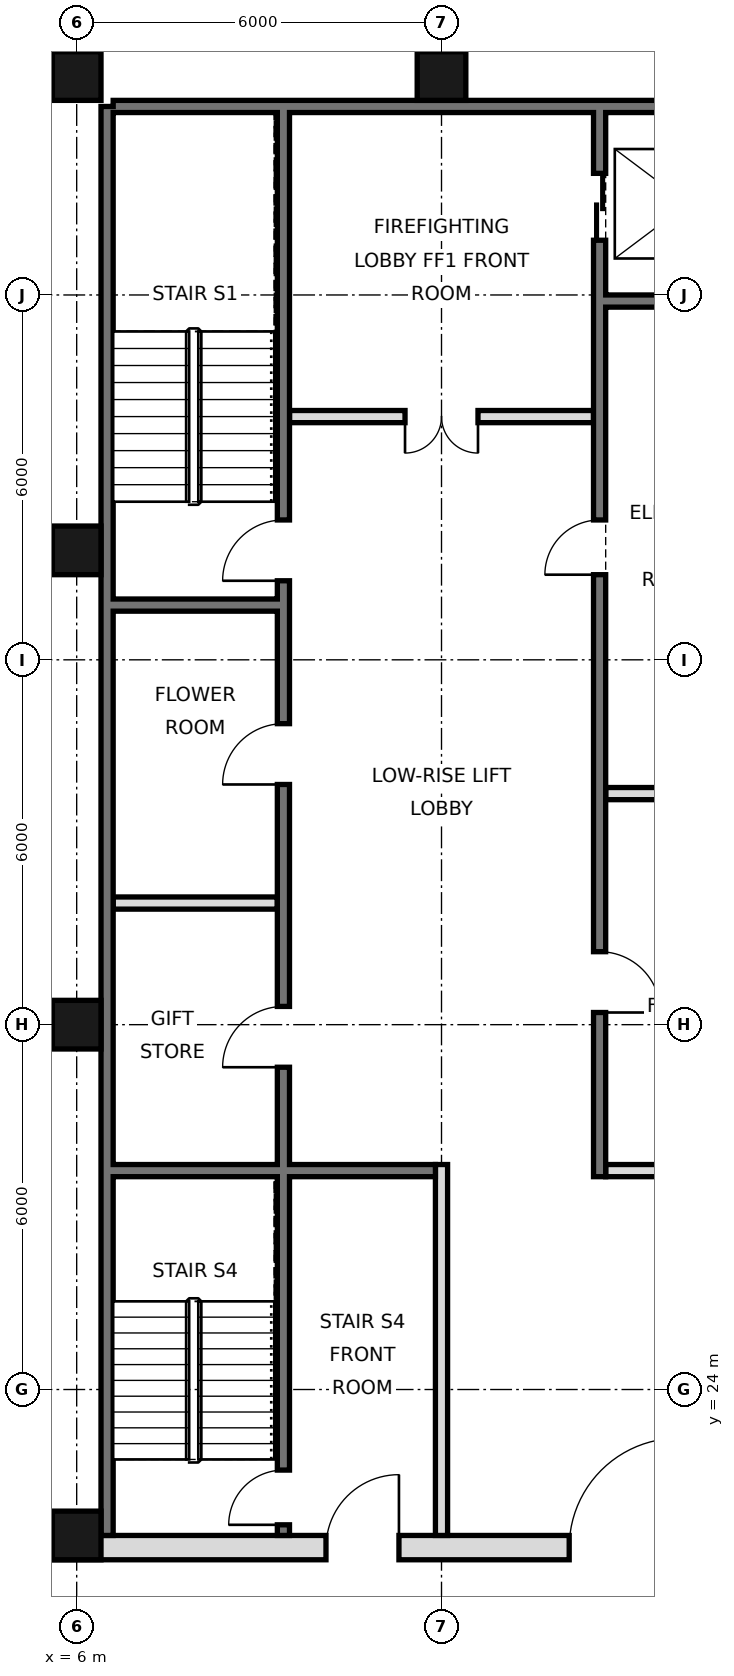
"""IFC4 building model, lengths in metres.
Left out: names, types, materials, properties, quantities, classifications, styles, units other than length and angle.
Written with IfcOpenShell. Run it as: python <this file> out.ifc"""

import sys

from ifc_helpers import new_model, si_unit, direction, frame, frame_2d, origin, origin_2d, place, context, subcontext, project, spatial, rectangle, hollow_rectangle, extrude, element, fill, save


model = new_model("IFC4")
c1 = context("Model", 3, precision=1e-05, world=origin(), true_north=direction((0.0, 1.0)))
c2 = subcontext(c1, "Body", "Model", "MODEL_VIEW")
j1 = project(units=[si_unit("LENGTHUNIT", "METRE"), si_unit("PLANEANGLEUNIT", "RADIAN")], contexts=[c1])
p1 = place(None, origin())
s1 = spatial("IfcSite", under=j1, at=p1, CompositionType="ELEMENT")
p2 = place(p1, origin())
s2 = spatial("IfcBuilding", under=s1, at=p2, CompositionType="ELEMENT")
p3 = place(p2, frame((0.0, 0.0, 263.0)))
s3 = spatial("IfcBuildingStorey", under=s2, at=p3, CompositionType="ELEMENT", Elevation=263.0)
for number, where, z_axis, x_axis in (
    (1, (6.0, 21.6, 0.0), (0.0, 0.0, 1.0), (1.0, 0.0, 0.0)),
    (2, (6.0, 30.0, 0.0), (0.0, 0.0, 1.0), (1.0, 0.0, 0.0)),
    (3, (6.0, 37.8, 0.0), (0.0, 0.0, 1.0), (1.0, 0.0, 0.0)),
    (4, (6.0, 45.6, 0.0), (0.0, 0.0, 1.0), (1.0, 0.0, 0.0)),
    (5, (12.0, 45.6, 0.0), (0.0, 0.0, 1.0), (1.0, 0.0, 0.0)),
):
    element("IfcColumn", number, at=place(p3, frame(where, z_axis=z_axis, x_axis=x_axis)), inside=s3, PredefinedType="COLUMN", context=c2, shape_type="SweptSolid", body=[
        extrude(hollow_rectangle(XDim=0.8, YDim=0.8, WallThickness=0.032, at=origin_2d()), origin(), (0.0, 0.0, 1.0), 3.6),
    ])
p4 = place(p3, frame((6.5, 21.6, 0.0), z_axis=(0.0, 0.0, 1.0), x_axis=(0.0, 1.0, 0.0)))
e6 = element("IfcWall", 6, at=p4, inside=s3, PredefinedType="SOLIDWALL", context=c2, shape_type="SweptSolid", body=[
    extrude(rectangle(XDim=23.5, YDim=0.2, at=frame_2d((11.75, 0.0))), origin(), (0.0, 0.0, 1.0), 3.42),
])
p5 = place(p3, frame((6.6, 45.1, 0.0), z_axis=(0.0, 0.0, 1.0), x_axis=(1.0, 0.0, 0.0)))
e7 = element("IfcWall", 7, at=p5, inside=s3, PredefinedType="SOLIDWALL", context=c2, shape_type="SweptSolid", body=[
    extrude(rectangle(XDim=34.8, YDim=0.2, at=frame_2d((17.4, 0.0))), origin(), (0.0, 0.0, 1.0), 3.42),
])
p6 = place(p3, frame((5.6, 21.4, 0.0), z_axis=(0.0, 0.0, 1.0), x_axis=(1.0, 0.0, 0.0)))
e8 = element("IfcWall", 8, at=p6, inside=s3, PredefinedType="SOLIDWALL", context=c2, shape_type="SweptSolid", body=[
    extrude(rectangle(XDim=36.8, YDim=0.4, at=frame_2d((18.4, 0.0))), origin(), (0.0, 0.0, 1.0), 3.42),
])
p7 = place(p6, frame((8.5, 0.0, 0.0)))
e9 = element("IfcOpeningElement", 9, at=p7, cuts=e8, PredefinedType="OPENING", context=c2, shape_type="SweptSolid", body=[
    extrude(rectangle(XDim=1.8, YDim=2.1, at=frame_2d((0.9, 1.05))), frame((0.0, 0.21, 0.0), z_axis=(0.0, -1.0, 0.0), x_axis=(1.0, 0.0, 0.0)), (0.0, 0.0, 1.0), 0.42),
])
p8 = place(p6, frame((17.5, 0.0, 0.0)))
e10 = element("IfcOpeningElement", 10, at=p8, cuts=e8, PredefinedType="OPENING", context=c2, shape_type="SweptSolid", body=[
    extrude(rectangle(XDim=1.8, YDim=2.1, at=frame_2d((0.9, 1.05))), frame((0.0, 0.21, 0.0), z_axis=(0.0, -1.0, 0.0), x_axis=(1.0, 0.0, 0.0)), (0.0, 0.0, 1.0), 0.42),
])
p9 = place(p6, frame((26.5, 0.0, 0.0)))
e11 = element("IfcOpeningElement", 11, at=p9, cuts=e8, PredefinedType="OPENING", context=c2, shape_type="SweptSolid", body=[
    extrude(rectangle(XDim=1.8, YDim=2.1, at=frame_2d((0.9, 1.05))), frame((0.0, 0.21, 0.0), z_axis=(0.0, -1.0, 0.0), x_axis=(1.0, 0.0, 0.0)), (0.0, 0.0, 1.0), 0.42),
])
p10 = place(p6, frame((4.5, 0.0, 0.0)))
e12 = element("IfcOpeningElement", 12, at=p10, cuts=e8, PredefinedType="OPENING", context=c2, shape_type="SweptSolid", body=[
    extrude(rectangle(XDim=1.2, YDim=2.1, at=frame_2d((0.6, 1.05))), frame((0.0, 0.21, 0.0), z_axis=(0.0, -1.0, 0.0), x_axis=(1.0, 0.0, 0.0)), (0.0, 0.0, 1.0), 0.42),
])
p11 = place(p6, frame((31.1, 0.0, 0.0)))
e13 = element("IfcOpeningElement", 13, at=p11, cuts=e8, PredefinedType="OPENING", context=c2, shape_type="SweptSolid", body=[
    extrude(rectangle(XDim=1.2, YDim=2.1, at=frame_2d((0.6, 1.05))), frame((0.0, 0.21, 0.0), z_axis=(0.0, -1.0, 0.0), x_axis=(1.0, 0.0, 0.0)), (0.0, 0.0, 1.0), 0.42),
])
p12 = place(p3, frame((12.0, 21.6, 0.0), z_axis=(0.0, 0.0, 1.0), x_axis=(0.0, 1.0, 0.0)))
e14 = element("IfcWall", 14, at=p12, inside=s3, PredefinedType="PARTITIONING", context=c2, shape_type="SweptSolid", body=[
    extrude(rectangle(XDim=6.1, YDim=0.2, at=frame_2d((3.05, 0.0))), origin(), (0.0, 0.0, 1.0), 3.42),
])
p13 = place(p3, frame((14.6, 27.5, 0.0), z_axis=(0.0, 0.0, 1.0), x_axis=(0.0, 1.0, 0.0)))
e15 = element("IfcWall", 15, at=p13, inside=s3, PredefinedType="SOLIDWALL", context=c2, shape_type="SweptSolid", body=[
    extrude(rectangle(XDim=17.5, YDim=0.2, at=frame_2d((8.75, 0.0))), origin(), (0.0, 0.0, 1.0), 3.42),
])
p14 = place(p13, frame((15.4, 0.0, 0.0)))
e16 = element("IfcOpeningElement", 16, at=p14, cuts=e15, PredefinedType="OPENING", context=c2, shape_type="SweptSolid", body=[
    extrude(rectangle(XDim=1.1, YDim=2.1, at=frame_2d((0.55, 1.05))), frame((0.0, 0.11, 0.0), z_axis=(0.0, -1.0, 0.0), x_axis=(1.0, 0.0, 0.0)), (0.0, 0.0, 1.0), 0.22),
])
p15 = place(p13, frame((2.7, 0.0, 0.0)))
e17 = element("IfcOpeningElement", 17, at=p15, cuts=e15, PredefinedType="OPENING", context=c2, shape_type="SweptSolid", body=[
    extrude(rectangle(XDim=1.0, YDim=2.1, at=frame_2d((0.5, 1.05))), frame((0.0, 0.11, 0.0), z_axis=(0.0, -1.0, 0.0), x_axis=(1.0, 0.0, 0.0)), (0.0, 0.0, 1.0), 0.22),
])
p16 = place(p13, frame((9.9, 0.0, 0.0)))
e18 = element("IfcOpeningElement", 18, at=p16, cuts=e15, PredefinedType="OPENING", context=c2, shape_type="SweptSolid", body=[
    extrude(rectangle(XDim=0.9, YDim=2.1, at=frame_2d((0.45, 1.05))), frame((0.0, 0.11, 0.0), z_axis=(0.0, -1.0, 0.0), x_axis=(1.0, 0.0, 0.0)), (0.0, 0.0, 1.0), 0.22),
])
p17 = place(p3, frame((9.4, 21.6, 0.0), z_axis=(0.0, 0.0, 1.0), x_axis=(0.0, 1.0, 0.0)))
e19 = element("IfcWall", 19, at=p17, inside=s3, PredefinedType="SOLIDWALL", context=c2, shape_type="SweptSolid", body=[
    extrude(rectangle(XDim=23.4, YDim=0.2, at=frame_2d((11.7, 0.0))), origin(), (0.0, 0.0, 1.0), 3.42),
])
p18 = place(p17, frame((7.7, 0.0, 0.0)))
e20 = element("IfcOpeningElement", 20, at=p18, cuts=e19, PredefinedType="OPENING", context=c2, shape_type="SweptSolid", body=[
    extrude(rectangle(XDim=1.0, YDim=2.1, at=frame_2d((0.5, 1.05))), frame((0.0, 0.11, 0.0), z_axis=(0.0, -1.0, 0.0), x_axis=(1.0, 0.0, 0.0)), (0.0, 0.0, 1.0), 0.22),
])
p19 = place(p17, frame((12.35, 0.0, 0.0)))
e21 = element("IfcOpeningElement", 21, at=p19, cuts=e19, PredefinedType="OPENING", context=c2, shape_type="SweptSolid", body=[
    extrude(rectangle(XDim=1.0, YDim=2.1, at=frame_2d((0.5, 1.05))), frame((0.0, 0.11, 0.0), z_axis=(0.0, -1.0, 0.0), x_axis=(1.0, 0.0, 0.0)), (0.0, 0.0, 1.0), 0.22),
])
p20 = place(p17, frame((15.7, 0.0, 0.0)))
e22 = element("IfcOpeningElement", 22, at=p20, cuts=e19, PredefinedType="OPENING", context=c2, shape_type="SweptSolid", body=[
    extrude(rectangle(XDim=1.0, YDim=2.1, at=frame_2d((0.5, 1.05))), frame((0.0, 0.11, 0.0), z_axis=(0.0, -1.0, 0.0), x_axis=(1.0, 0.0, 0.0)), (0.0, 0.0, 1.0), 0.22),
])
p21 = place(p17, frame((0.175, 0.0, 0.0)))
e23 = element("IfcOpeningElement", 23, at=p21, cuts=e19, PredefinedType="OPENING", context=c2, shape_type="SweptSolid", body=[
    extrude(rectangle(XDim=0.9, YDim=2.1, at=frame_2d((0.45, 1.05))), frame((0.0, 0.11, 0.0), z_axis=(0.0, -1.0, 0.0), x_axis=(1.0, 0.0, 0.0)), (0.0, 0.0, 1.0), 0.22),
])
p22 = place(p3, frame((14.7, 27.6, 0.0), z_axis=(0.0, 0.0, 1.0), x_axis=(1.0, 0.0, 0.0)))
e24 = element("IfcWall", 24, at=p22, inside=s3, PredefinedType="PARTITIONING", context=c2, shape_type="SweptSolid", body=[
    extrude(rectangle(XDim=2.7, YDim=0.2, at=frame_2d((1.35, 0.0))), origin(), (0.0, 0.0, 1.0), 3.42),
])
p23 = place(p3, frame((6.6, 27.6, 0.0), z_axis=(0.0, 0.0, 1.0), x_axis=(1.0, 0.0, 0.0)))
e25 = element("IfcWall", 25, at=p23, inside=s3, PredefinedType="SOLIDWALL", context=c2, shape_type="SweptSolid", body=[
    extrude(rectangle(XDim=5.3, YDim=0.2, at=frame_2d((2.65, 0.0))), origin(), (0.0, 0.0, 1.0), 3.42),
])
p24 = place(p3, frame((6.6, 32.0, 0.0), z_axis=(0.0, 0.0, 1.0), x_axis=(1.0, 0.0, 0.0)))
e26 = element("IfcWall", 26, at=p24, inside=s3, PredefinedType="PARTITIONING", context=c2, shape_type="SweptSolid", body=[
    extrude(rectangle(XDim=2.7, YDim=0.2, at=frame_2d((1.35, 0.0))), origin(), (0.0, 0.0, 1.0), 3.42),
])
for number, where, z_axis, x_axis in (
    (27, (14.7, 33.8, 0.0), (0.0, 0.0, 1.0), (1.0, 0.0, 0.0)),
    (28, (6.6, 36.9, 0.0), (0.0, 0.0, 1.0), (1.0, 0.0, 0.0)),
):
    element("IfcWall", number, at=place(p3, frame(where, z_axis=z_axis, x_axis=x_axis)), inside=s3, PredefinedType="SOLIDWALL", context=c2, shape_type="SweptSolid", body=[
        extrude(rectangle(XDim=2.7, YDim=0.2, at=frame_2d((1.35, 0.0))), origin(), (0.0, 0.0, 1.0), 3.42),
    ])
p25 = place(p3, frame((9.5, 40.0, 0.0), z_axis=(0.0, 0.0, 1.0), x_axis=(1.0, 0.0, 0.0)))
e29 = element("IfcWall", 29, at=p25, inside=s3, PredefinedType="PARTITIONING", context=c2, shape_type="SweptSolid", body=[
    extrude(rectangle(XDim=5.0, YDim=0.2, at=frame_2d((2.5, 0.0))), origin(), (0.0, 0.0, 1.0), 3.42),
])
p26 = place(p25, frame((1.9, 0.0, 0.0)))
e30 = element("IfcOpeningElement", 30, at=p26, cuts=e29, PredefinedType="OPENING", context=c2, shape_type="SweptSolid", body=[
    extrude(rectangle(XDim=1.2, YDim=2.1, at=frame_2d((0.6, 1.05))), frame((0.0, 0.11, 0.0), z_axis=(0.0, -1.0, 0.0), x_axis=(1.0, 0.0, 0.0)), (0.0, 0.0, 1.0), 0.22),
])
p27 = place(p3, frame((14.7, 41.9, 0.0), z_axis=(0.0, 0.0, 1.0), x_axis=(1.0, 0.0, 0.0)))
e31 = element("IfcWall", 31, at=p27, inside=s3, PredefinedType="SOLIDWALL", context=c2, shape_type="SweptSolid", body=[
    extrude(rectangle(XDim=2.7, YDim=0.2, at=frame_2d((1.35, 0.0))), origin(), (0.0, 0.0, 1.0), 3.42),
])
p28 = place(p7, frame((1.8, 0.0, 0.0), z_axis=(0.0, 0.0, 1.0), x_axis=(-1.0, 0.0, 0.0)))
e32 = element("IfcDoor", 32, at=p28, inside=s3, OperationType="SINGLE_SWING_LEFT", PredefinedType="DOOR", context=c2, shape_type="SweptSolid", body=[
    extrude(rectangle(XDim=1.8, YDim=2.1, at=frame_2d((0.9, 1.05))), frame((0.0, 0.025, 0.0), z_axis=(0.0, -1.0, 0.0), x_axis=(1.0, 0.0, 0.0)), (0.0, 0.0, 1.0), 0.05),
])
fill(e9, e32)
p29 = place(p10, frame((1.2, 0.0, 0.0), z_axis=(0.0, 0.0, 1.0), x_axis=(-1.0, 0.0, 0.0)))
e33 = element("IfcDoor", 33, at=p29, inside=s3, OperationType="SINGLE_SWING_LEFT", PredefinedType="DOOR", context=c2, shape_type="SweptSolid", body=[
    extrude(rectangle(XDim=1.2, YDim=2.1, at=frame_2d((0.6, 1.05))), frame((0.0, 0.025, 0.0), z_axis=(0.0, -1.0, 0.0), x_axis=(1.0, 0.0, 0.0)), (0.0, 0.0, 1.0), 0.05),
])
fill(e12, e33)
p30 = place(p26, frame((1.2, 0.0, 0.0), z_axis=(0.0, 0.0, 1.0), x_axis=(-1.0, 0.0, 0.0)))
e34 = element("IfcDoor", 34, at=p30, inside=s3, OperationType="DOUBLE_DOOR_SINGLE_SWING", PredefinedType="DOOR", context=c2, shape_type="SweptSolid", body=[
    extrude(rectangle(XDim=1.2, YDim=2.1, at=frame_2d((0.6, 1.05))), frame((0.0, 0.025, 0.0), z_axis=(0.0, -1.0, 0.0), x_axis=(1.0, 0.0, 0.0)), (0.0, 0.0, 1.0), 0.05),
])
fill(e30, e34)
p31 = place(p14, origin())
e35 = element("IfcDoor", 35, at=p31, inside=s3, OperationType="DOUBLE_DOOR_SLIDING", PredefinedType="DOOR", context=c2, shape_type="SweptSolid", body=[
    extrude(rectangle(XDim=1.1, YDim=2.1, at=frame_2d((0.55, 1.05))), frame((0.0, 0.025, 0.0), z_axis=(0.0, -1.0, 0.0), x_axis=(1.0, 0.0, 0.0)), (0.0, 0.0, 1.0), 0.05),
])
fill(e16, e35)
p32 = place(p15, frame((1.0, 0.0, 0.0), z_axis=(0.0, 0.0, 1.0), x_axis=(-1.0, 0.0, 0.0)))
e36 = element("IfcDoor", 36, at=p32, inside=s3, OperationType="SINGLE_SWING_RIGHT", PredefinedType="DOOR", context=c2, shape_type="SweptSolid", body=[
    extrude(rectangle(XDim=1.0, YDim=2.1, at=frame_2d((0.5, 1.05))), frame((0.0, 0.025, 0.0), z_axis=(0.0, -1.0, 0.0), x_axis=(1.0, 0.0, 0.0)), (0.0, 0.0, 1.0), 0.05),
])
fill(e17, e36)
p33 = place(p18, origin())
e37 = element("IfcDoor", 37, at=p33, inside=s3, OperationType="SINGLE_SWING_LEFT", PredefinedType="DOOR", context=c2, shape_type="SweptSolid", body=[
    extrude(rectangle(XDim=1.0, YDim=2.1, at=frame_2d((0.5, 1.05))), frame((0.0, 0.025, 0.0), z_axis=(0.0, -1.0, 0.0), x_axis=(1.0, 0.0, 0.0)), (0.0, 0.0, 1.0), 0.05),
])
fill(e20, e37)
p34 = place(p19, origin())
e38 = element("IfcDoor", 38, at=p34, inside=s3, OperationType="SINGLE_SWING_LEFT", PredefinedType="DOOR", context=c2, shape_type="SweptSolid", body=[
    extrude(rectangle(XDim=1.0, YDim=2.1, at=frame_2d((0.5, 1.05))), frame((0.0, 0.025, 0.0), z_axis=(0.0, -1.0, 0.0), x_axis=(1.0, 0.0, 0.0)), (0.0, 0.0, 1.0), 0.05),
])
fill(e21, e38)
p35 = place(p20, origin())
e39 = element("IfcDoor", 39, at=p35, inside=s3, OperationType="SINGLE_SWING_LEFT", PredefinedType="DOOR", context=c2, shape_type="SweptSolid", body=[
    extrude(rectangle(XDim=1.0, YDim=2.1, at=frame_2d((0.5, 1.05))), frame((0.0, 0.025, 0.0), z_axis=(0.0, -1.0, 0.0), x_axis=(1.0, 0.0, 0.0)), (0.0, 0.0, 1.0), 0.05),
])
fill(e22, e39)
p36 = place(p21, origin())
e40 = element("IfcDoor", 40, at=p36, inside=s3, OperationType="SINGLE_SWING_LEFT", PredefinedType="DOOR", context=c2, shape_type="SweptSolid", body=[
    extrude(rectangle(XDim=0.9, YDim=2.1, at=frame_2d((0.45, 1.05))), frame((0.0, 0.025, 0.0), z_axis=(0.0, -1.0, 0.0), x_axis=(1.0, 0.0, 0.0)), (0.0, 0.0, 1.0), 0.05),
])
fill(e23, e40)
p37 = place(p16, origin())
e41 = element("IfcDoor", 41, at=p37, inside=s3, OperationType="SINGLE_SWING_LEFT", PredefinedType="DOOR", context=c2, shape_type="SweptSolid", body=[
    extrude(rectangle(XDim=0.9, YDim=2.1, at=frame_2d((0.45, 1.05))), frame((0.0, 0.025, 0.0), z_axis=(0.0, -1.0, 0.0), x_axis=(1.0, 0.0, 0.0)), (0.0, 0.0, 1.0), 0.05),
])
fill(e18, e41)
save(model, sys.argv[1])
